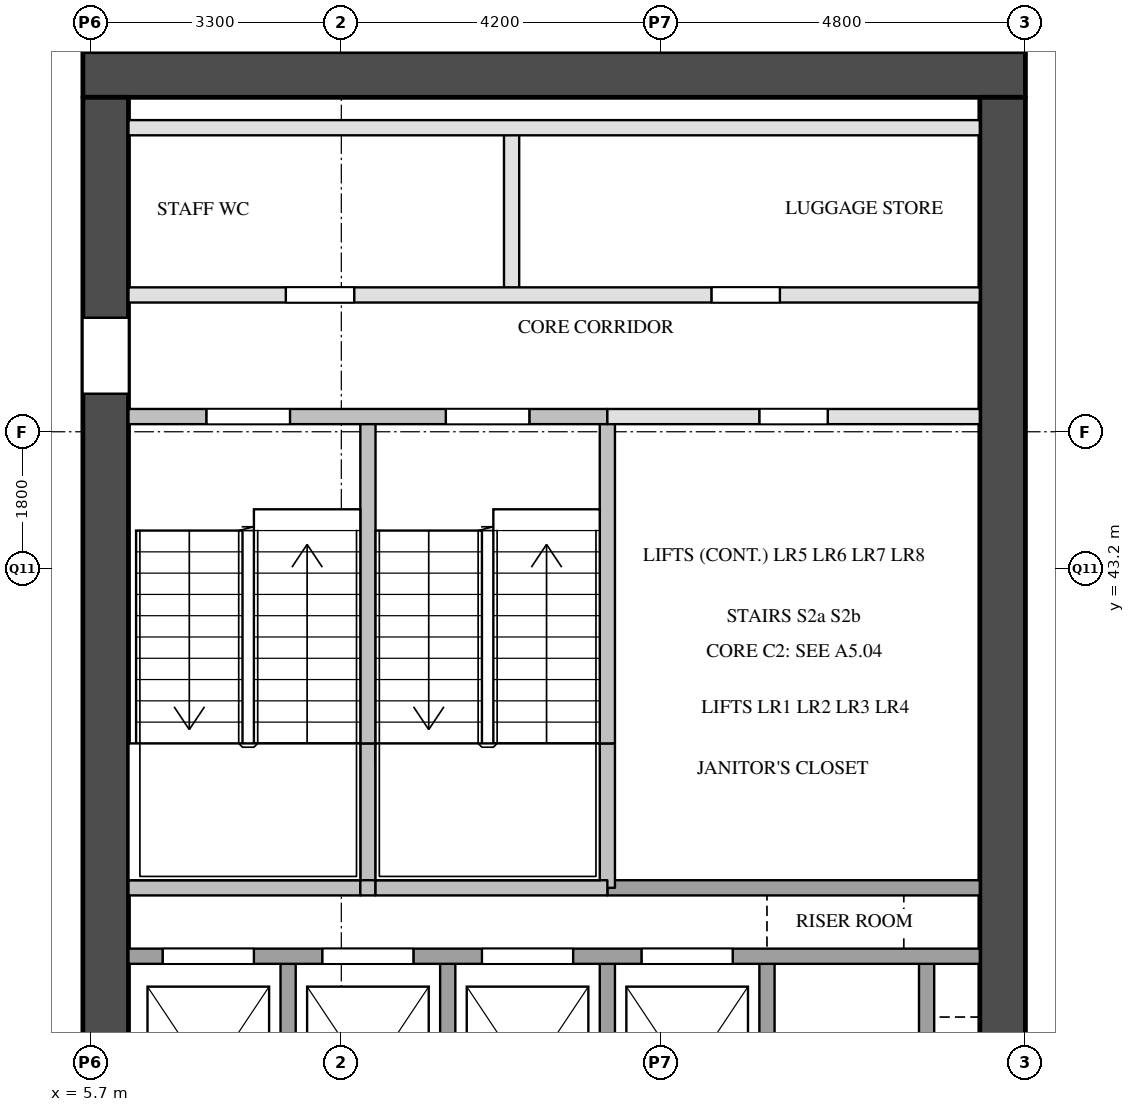
"""IFC4 building model, lengths in metres.
Left out: names, types, materials, properties, quantities, classifications, styles, units other than length and angle.
Written with IfcOpenShell. Run it as: python <this file> out.ifc"""

import sys

from ifc_helpers import new_model, si_unit, direction, frame, frame_2d, origin, place, context, subcontext, project, spatial, rectangle, extrude, element, fill, save


model = new_model("IFC4")
c1 = context("Model", 3, precision=1e-05, world=origin(), true_north=direction((0.0, 1.0)))
c2 = subcontext(c1, "Body", "Model", "MODEL_VIEW")
j1 = project(units=[si_unit("LENGTHUNIT", "METRE"), si_unit("PLANEANGLEUNIT", "RADIAN")], contexts=[c1])
p1 = place(None, origin())
s1 = spatial("IfcSite", under=j1, at=p1, CompositionType="ELEMENT")
p2 = place(p1, origin())
s2 = spatial("IfcBuilding", under=s1, at=p2, CompositionType="ELEMENT")
p3 = place(p2, frame((0.0, 0.0, 31.0)))
s3 = spatial("IfcBuildingStorey", under=s2, at=p3, CompositionType="ELEMENT", Elevation=31.0)
p4 = place(p3, frame((5.6, 49.7, 0.0), z_axis=(0.0, 0.0, 1.0), x_axis=(1.0, 0.0, 0.0)))
e1 = element("IfcWall", 1, at=p4, inside=s3, PredefinedType="SHEAR", context=c2, shape_type="SweptSolid", body=[
    extrude(rectangle(XDim=12.4, YDim=0.6, at=frame_2d((6.2, 0.0))), origin(), (0.0, 0.0, 1.0), 3.5),
])
p5 = place(p3, frame((5.9, 29.1, 0.0), z_axis=(0.0, 0.0, 1.0), x_axis=(0.0, 1.0, 0.0)))
e2 = element("IfcWall", 2, at=p5, inside=s3, PredefinedType="SHEAR", context=c2, shape_type="SweptSolid", body=[
    extrude(rectangle(XDim=20.3, YDim=0.6, at=frame_2d((10.15, 0.0))), origin(), (0.0, 0.0, 1.0), 3.5),
])
p6 = place(p5, frame((3.6, 0.0, 0.0)))
e3 = element("IfcOpeningElement", 3, at=p6, cuts=e2, PredefinedType="OPENING", context=c2, shape_type="SweptSolid", body=[
    extrude(rectangle(XDim=1.8, YDim=2.1, at=frame_2d((0.9, 1.05))), frame((0.0, 0.31, 0.0), z_axis=(0.0, -1.0, 0.0), x_axis=(1.0, 0.0, 0.0)), (0.0, 0.0, 1.0), 0.62),
])
p7 = place(p5, frame((16.4, 0.0, 0.0)))
e4 = element("IfcOpeningElement", 4, at=p7, cuts=e2, PredefinedType="OPENING", context=c2, shape_type="SweptSolid", body=[
    extrude(rectangle(XDim=1.0, YDim=2.1, at=frame_2d((0.5, 1.05))), frame((0.0, 0.31, 0.0), z_axis=(0.0, -1.0, 0.0), x_axis=(1.0, 0.0, 0.0)), (0.0, 0.0, 1.0), 0.62),
])
p8 = place(p3, frame((17.7, 29.1, 0.0), z_axis=(0.0, 0.0, 1.0), x_axis=(0.0, 1.0, 0.0)))
e5 = element("IfcWall", 5, at=p8, inside=s3, PredefinedType="SHEAR", context=c2, shape_type="SweptSolid", body=[
    extrude(rectangle(XDim=20.3, YDim=0.6, at=frame_2d((10.15, 0.0))), origin(), (0.0, 0.0, 1.0), 3.5),
])
p9 = place(p8, frame((1.25, 0.0, 0.0)))
e6 = element("IfcOpeningElement", 6, at=p9, cuts=e5, PredefinedType="OPENING", context=c2, shape_type="SweptSolid", body=[
    extrude(rectangle(XDim=0.7, YDim=2.1, at=frame_2d((0.35, 1.05))), frame((0.0, 0.31, 0.0), z_axis=(0.0, -1.0, 0.0), x_axis=(1.0, 0.0, 0.0)), (0.0, 0.0, 1.0), 0.62),
])
p10 = place(p8, frame((7.05, 0.0, 0.0)))
e7 = element("IfcOpeningElement", 7, at=p10, cuts=e5, PredefinedType="OPENING", context=c2, shape_type="SweptSolid", body=[
    extrude(rectangle(XDim=0.7, YDim=2.1, at=frame_2d((0.35, 1.05))), frame((0.0, 0.31, 0.0), z_axis=(0.0, -1.0, 0.0), x_axis=(1.0, 0.0, 0.0)), (0.0, 0.0, 1.0), 0.62),
])
p11 = place(p3, frame((8.3, 34.9, 0.0), z_axis=(0.0, 0.0, 1.0), x_axis=(0.0, 1.0, 0.0)))
e8 = element("IfcWall", 8, at=p11, inside=s3, PredefinedType="SOLIDWALL", context=c2, shape_type="SweptSolid", body=[
    extrude(rectangle(XDim=3.2, YDim=0.2, at=frame_2d((1.6, 0.0))), origin(), (0.0, 0.0, 1.0), 3.5),
])
p12 = place(p3, frame((9.35, 39.0, 0.0), z_axis=(0.0, 0.0, 1.0), x_axis=(0.0, 1.0, 0.0)))
e9 = element("IfcWall", 9, at=p12, inside=s3, PredefinedType="SOLIDWALL", context=c2, shape_type="SweptSolid", body=[
    extrude(rectangle(XDim=1.9, YDim=0.2, at=frame_2d((0.95, 0.0))), origin(), (0.0, 0.0, 1.0), 3.5),
])
p13 = place(p3, frame((9.35, 40.9, 0.0), z_axis=(0.0, 0.0, 1.0), x_axis=(0.0, 1.0, 0.0)))
e10 = element("IfcWall", 10, at=p13, inside=s3, PredefinedType="SOLIDWALL", context=c2, shape_type="SweptSolid", body=[
    extrude(rectangle(XDim=4.3, YDim=0.2, at=frame_2d((2.15, 0.0))), origin(), (0.0, 0.0, 1.0), 3.5),
])
p14 = place(p3, frame((10.4, 34.9, 0.0), z_axis=(0.0, 0.0, 1.0), x_axis=(0.0, 1.0, 0.0)))
e11 = element("IfcWall", 11, at=p14, inside=s3, PredefinedType="SOLIDWALL", context=c2, shape_type="SweptSolid", body=[
    extrude(rectangle(XDim=3.2, YDim=0.2, at=frame_2d((1.6, 0.0))), origin(), (0.0, 0.0, 1.0), 3.5),
])
p15 = place(p3, frame((11.24, 46.8, 0.0), z_axis=(0.0, 0.0, 1.0), x_axis=(0.0, 1.0, 0.0)))
e12 = element("IfcWall", 12, at=p15, inside=s3, PredefinedType="PARTITIONING", context=c2, shape_type="SweptSolid", body=[
    extrude(rectangle(XDim=2.2, YDim=0.2, at=frame_2d((1.1, 0.0))), origin(), (0.0, 0.0, 1.0), 3.5),
])
p16 = place(p3, frame((12.5, 34.9, 0.0), z_axis=(0.0, 0.0, 1.0), x_axis=(0.0, 1.0, 0.0)))
e13 = element("IfcWall", 13, at=p16, inside=s3, PredefinedType="SOLIDWALL", context=c2, shape_type="SweptSolid", body=[
    extrude(rectangle(XDim=3.2, YDim=0.2, at=frame_2d((1.6, 0.0))), origin(), (0.0, 0.0, 1.0), 3.5),
])
p17 = place(p3, frame((12.5, 39.0, 0.0), z_axis=(0.0, 0.0, 1.0), x_axis=(0.0, 1.0, 0.0)))
e14 = element("IfcWall", 14, at=p17, inside=s3, PredefinedType="SOLIDWALL", context=c2, shape_type="SweptSolid", body=[
    extrude(rectangle(XDim=1.9, YDim=0.2, at=frame_2d((0.95, 0.0))), origin(), (0.0, 0.0, 1.0), 3.5),
])
p18 = place(p3, frame((12.5, 40.9, 0.0), z_axis=(0.0, 0.0, 1.0), x_axis=(0.0, 1.0, 0.0)))
e15 = element("IfcWall", 15, at=p18, inside=s3, PredefinedType="SOLIDWALL", context=c2, shape_type="SweptSolid", body=[
    extrude(rectangle(XDim=4.3, YDim=0.2, at=frame_2d((2.15, 0.0))), origin(), (0.0, 0.0, 1.0), 3.5),
])
for number, where, z_axis, x_axis in (
    (16, (14.6, 34.9, 0.0), (0.0, 0.0, 1.0), (0.0, 1.0, 0.0)),
    (17, (16.7, 34.9, 0.0), (0.0, 0.0, 1.0), (0.0, 1.0, 0.0)),
):
    element("IfcWall", number, at=place(p3, frame(where, z_axis=z_axis, x_axis=x_axis)), inside=s3, PredefinedType="SOLIDWALL", context=c2, shape_type="SweptSolid", body=[
        extrude(rectangle(XDim=3.2, YDim=0.2, at=frame_2d((1.6, 0.0))), origin(), (0.0, 0.0, 1.0), 3.5),
    ])
p19 = place(p3, frame((6.2, 38.1, 0.0), z_axis=(0.0, 0.0, 1.0), x_axis=(1.0, 0.0, 0.0)))
e18 = element("IfcWall", 18, at=p19, inside=s3, PredefinedType="SOLIDWALL", context=c2, shape_type="SweptSolid", body=[
    extrude(rectangle(XDim=11.2, YDim=0.2, at=frame_2d((5.6, 0.0))), origin(), (0.0, 0.0, 1.0), 3.5),
])
p20 = place(p19, frame((0.45, 0.0, 0.0)))
e19 = element("IfcOpeningElement", 19, at=p20, cuts=e18, PredefinedType="OPENING", context=c2, shape_type="SweptSolid", body=[
    extrude(rectangle(XDim=1.2, YDim=2.1, at=frame_2d((0.6, 1.05))), frame((0.0, 0.11, 0.0), z_axis=(0.0, -1.0, 0.0), x_axis=(1.0, 0.0, 0.0)), (0.0, 0.0, 1.0), 0.22),
])
p21 = place(p19, frame((2.55, 0.0, 0.0)))
e20 = element("IfcOpeningElement", 20, at=p21, cuts=e18, PredefinedType="OPENING", context=c2, shape_type="SweptSolid", body=[
    extrude(rectangle(XDim=1.2, YDim=2.1, at=frame_2d((0.6, 1.05))), frame((0.0, 0.11, 0.0), z_axis=(0.0, -1.0, 0.0), x_axis=(1.0, 0.0, 0.0)), (0.0, 0.0, 1.0), 0.22),
])
p22 = place(p19, frame((4.65, 0.0, 0.0)))
e21 = element("IfcOpeningElement", 21, at=p22, cuts=e18, PredefinedType="OPENING", context=c2, shape_type="SweptSolid", body=[
    extrude(rectangle(XDim=1.2, YDim=2.1, at=frame_2d((0.6, 1.05))), frame((0.0, 0.11, 0.0), z_axis=(0.0, -1.0, 0.0), x_axis=(1.0, 0.0, 0.0)), (0.0, 0.0, 1.0), 0.22),
])
p23 = place(p19, frame((6.75, 0.0, 0.0)))
e22 = element("IfcOpeningElement", 22, at=p23, cuts=e18, PredefinedType="OPENING", context=c2, shape_type="SweptSolid", body=[
    extrude(rectangle(XDim=1.2, YDim=2.1, at=frame_2d((0.6, 1.05))), frame((0.0, 0.11, 0.0), z_axis=(0.0, -1.0, 0.0), x_axis=(1.0, 0.0, 0.0)), (0.0, 0.0, 1.0), 0.22),
])
p24 = place(p3, frame((12.5, 39.0, 0.0), z_axis=(0.0, 0.0, 1.0), x_axis=(1.0, 0.0, 0.0)))
e23 = element("IfcWall", 23, at=p24, inside=s3, PredefinedType="SOLIDWALL", context=c2, shape_type="SweptSolid", body=[
    extrude(rectangle(XDim=4.9, YDim=0.2, at=frame_2d((2.45, 0.0))), origin(), (0.0, 0.0, 1.0), 3.5),
])
p25 = place(p3, frame((6.2, 39.0, 0.0), z_axis=(0.0, 0.0, 1.0), x_axis=(1.0, 0.0, 0.0)))
e24 = element("IfcWall", 24, at=p25, inside=s3, PredefinedType="SOLIDWALL", context=c2, shape_type="SweptSolid", body=[
    extrude(rectangle(XDim=3.05, YDim=0.2, at=frame_2d((1.525, 0.0))), origin(), (0.0, 0.0, 1.0), 3.5),
])
p26 = place(p3, frame((9.25, 39.0, 0.0), z_axis=(0.0, 0.0, 1.0), x_axis=(1.0, 0.0, 0.0)))
e25 = element("IfcWall", 25, at=p26, inside=s3, PredefinedType="SOLIDWALL", context=c2, shape_type="SweptSolid", body=[
    extrude(rectangle(XDim=0.2, YDim=0.2, at=frame_2d((0.1, 0.0))), origin(), (0.0, 0.0, 1.0), 3.5),
])
p27 = place(p3, frame((9.45, 39.0, 0.0), z_axis=(0.0, 0.0, 1.0), x_axis=(1.0, 0.0, 0.0)))
e26 = element("IfcWall", 26, at=p27, inside=s3, PredefinedType="SOLIDWALL", context=c2, shape_type="SweptSolid", body=[
    extrude(rectangle(XDim=3.05, YDim=0.2, at=frame_2d((1.525, 0.0))), origin(), (0.0, 0.0, 1.0), 3.5),
])
p28 = place(p3, frame((12.5, 45.2, 0.0), z_axis=(0.0, 0.0, 1.0), x_axis=(1.0, 0.0, 0.0)))
e27 = element("IfcWall", 27, at=p28, inside=s3, PredefinedType="PARTITIONING", context=c2, shape_type="SweptSolid", body=[
    extrude(rectangle(XDim=4.9, YDim=0.2, at=frame_2d((2.45, 0.0))), origin(), (0.0, 0.0, 1.0), 3.5),
])
p29 = place(p28, frame((2.0, 0.0, 0.0)))
e28 = element("IfcOpeningElement", 28, at=p29, cuts=e27, PredefinedType="OPENING", context=c2, shape_type="SweptSolid", body=[
    extrude(rectangle(XDim=0.9, YDim=2.1, at=frame_2d((0.45, 1.05))), frame((0.0, 0.11, 0.0), z_axis=(0.0, -1.0, 0.0), x_axis=(1.0, 0.0, 0.0)), (0.0, 0.0, 1.0), 0.22),
])
p30 = place(p3, frame((6.2, 45.2, 0.0), z_axis=(0.0, 0.0, 1.0), x_axis=(1.0, 0.0, 0.0)))
e29 = element("IfcWall", 29, at=p30, inside=s3, PredefinedType="SOLIDWALL", context=c2, shape_type="SweptSolid", body=[
    extrude(rectangle(XDim=6.3, YDim=0.2, at=frame_2d((3.15, 0.0))), origin(), (0.0, 0.0, 1.0), 3.5),
])
p31 = place(p30, frame((1.025, 0.0, 0.0)))
e30 = element("IfcOpeningElement", 30, at=p31, cuts=e29, PredefinedType="OPENING", context=c2, shape_type="SweptSolid", body=[
    extrude(rectangle(XDim=1.1, YDim=2.1, at=frame_2d((0.55, 1.05))), frame((0.0, 0.11, 0.0), z_axis=(0.0, -1.0, 0.0), x_axis=(1.0, 0.0, 0.0)), (0.0, 0.0, 1.0), 0.22),
])
p32 = place(p30, frame((4.175, 0.0, 0.0)))
e31 = element("IfcOpeningElement", 31, at=p32, cuts=e29, PredefinedType="OPENING", context=c2, shape_type="SweptSolid", body=[
    extrude(rectangle(XDim=1.1, YDim=2.1, at=frame_2d((0.55, 1.05))), frame((0.0, 0.11, 0.0), z_axis=(0.0, -1.0, 0.0), x_axis=(1.0, 0.0, 0.0)), (0.0, 0.0, 1.0), 0.22),
])
p33 = place(p3, frame((6.2, 46.8, 0.0), z_axis=(0.0, 0.0, 1.0), x_axis=(1.0, 0.0, 0.0)))
e32 = element("IfcWall", 32, at=p33, inside=s3, PredefinedType="PARTITIONING", context=c2, shape_type="SweptSolid", body=[
    extrude(rectangle(XDim=11.2, YDim=0.2, at=frame_2d((5.6, 0.0))), origin(), (0.0, 0.0, 1.0), 3.5),
])
p34 = place(p33, frame((2.07, 0.0, 0.0)))
e33 = element("IfcOpeningElement", 33, at=p34, cuts=e32, PredefinedType="OPENING", context=c2, shape_type="SweptSolid", body=[
    extrude(rectangle(XDim=0.9, YDim=2.1, at=frame_2d((0.45, 1.05))), frame((0.0, 0.11, 0.0), z_axis=(0.0, -1.0, 0.0), x_axis=(1.0, 0.0, 0.0)), (0.0, 0.0, 1.0), 0.22),
])
p35 = place(p33, frame((7.67, 0.0, 0.0)))
e34 = element("IfcOpeningElement", 34, at=p35, cuts=e32, PredefinedType="OPENING", context=c2, shape_type="SweptSolid", body=[
    extrude(rectangle(XDim=0.9, YDim=2.1, at=frame_2d((0.45, 1.05))), frame((0.0, 0.11, 0.0), z_axis=(0.0, -1.0, 0.0), x_axis=(1.0, 0.0, 0.0)), (0.0, 0.0, 1.0), 0.22),
])
p36 = place(p3, frame((6.2, 49.0, 0.0), z_axis=(0.0, 0.0, 1.0), x_axis=(1.0, 0.0, 0.0)))
e35 = element("IfcWall", 35, at=p36, inside=s3, PredefinedType="PARTITIONING", context=c2, shape_type="SweptSolid", body=[
    extrude(rectangle(XDim=11.2, YDim=0.2, at=frame_2d((5.6, 0.0))), origin(), (0.0, 0.0, 1.0), 3.5),
])
p37 = place(p20, origin())
e36 = element("IfcDoor", 36, at=p37, inside=s3, OperationType="SLIDING_TO_LEFT", PredefinedType="DOOR", context=c2, shape_type="SweptSolid", body=[
    extrude(rectangle(XDim=1.2, YDim=2.1, at=frame_2d((0.6, 1.05))), frame((0.0, 0.025, 0.0), z_axis=(0.0, -1.0, 0.0), x_axis=(1.0, 0.0, 0.0)), (0.0, 0.0, 1.0), 0.05),
])
fill(e19, e36)
p38 = place(p21, origin())
e37 = element("IfcDoor", 37, at=p38, inside=s3, OperationType="SLIDING_TO_LEFT", PredefinedType="DOOR", context=c2, shape_type="SweptSolid", body=[
    extrude(rectangle(XDim=1.2, YDim=2.1, at=frame_2d((0.6, 1.05))), frame((0.0, 0.025, 0.0), z_axis=(0.0, -1.0, 0.0), x_axis=(1.0, 0.0, 0.0)), (0.0, 0.0, 1.0), 0.05),
])
fill(e20, e37)
p39 = place(p22, origin())
e38 = element("IfcDoor", 38, at=p39, inside=s3, OperationType="SLIDING_TO_LEFT", PredefinedType="DOOR", context=c2, shape_type="SweptSolid", body=[
    extrude(rectangle(XDim=1.2, YDim=2.1, at=frame_2d((0.6, 1.05))), frame((0.0, 0.025, 0.0), z_axis=(0.0, -1.0, 0.0), x_axis=(1.0, 0.0, 0.0)), (0.0, 0.0, 1.0), 0.05),
])
fill(e21, e38)
p40 = place(p23, origin())
e39 = element("IfcDoor", 39, at=p40, inside=s3, OperationType="SLIDING_TO_LEFT", PredefinedType="DOOR", context=c2, shape_type="SweptSolid", body=[
    extrude(rectangle(XDim=1.2, YDim=2.1, at=frame_2d((0.6, 1.05))), frame((0.0, 0.025, 0.0), z_axis=(0.0, -1.0, 0.0), x_axis=(1.0, 0.0, 0.0)), (0.0, 0.0, 1.0), 0.05),
])
fill(e22, e39)
p41 = place(p31, origin())
e40 = element("IfcDoor", 40, at=p41, inside=s3, OperationType="SINGLE_SWING_LEFT", PredefinedType="DOOR", context=c2, shape_type="SweptSolid", body=[
    extrude(rectangle(XDim=1.1, YDim=2.1, at=frame_2d((0.55, 1.05))), frame((0.0, 0.025, 0.0), z_axis=(0.0, -1.0, 0.0), x_axis=(1.0, 0.0, 0.0)), (0.0, 0.0, 1.0), 0.05),
])
fill(e30, e40)
p42 = place(p32, origin())
e41 = element("IfcDoor", 41, at=p42, inside=s3, OperationType="SINGLE_SWING_RIGHT", PredefinedType="DOOR", context=c2, shape_type="SweptSolid", body=[
    extrude(rectangle(XDim=1.1, YDim=2.1, at=frame_2d((0.55, 1.05))), frame((0.0, 0.025, 0.0), z_axis=(0.0, -1.0, 0.0), x_axis=(1.0, 0.0, 0.0)), (0.0, 0.0, 1.0), 0.05),
])
fill(e31, e41)
p43 = place(p7, origin())
e42 = element("IfcDoor", 42, at=p43, inside=s3, OperationType="SINGLE_SWING_RIGHT", PredefinedType="DOOR", context=c2, shape_type="SweptSolid", body=[
    extrude(rectangle(XDim=1.0, YDim=2.1, at=frame_2d((0.5, 1.05))), frame((0.0, 0.025, 0.0), z_axis=(0.0, -1.0, 0.0), x_axis=(1.0, 0.0, 0.0)), (0.0, 0.0, 1.0), 0.05),
])
fill(e4, e42)
p44 = place(p34, origin())
e43 = element("IfcDoor", 43, at=p44, inside=s3, OperationType="SINGLE_SWING_LEFT", PredefinedType="DOOR", context=c2, shape_type="SweptSolid", body=[
    extrude(rectangle(XDim=0.9, YDim=2.1, at=frame_2d((0.45, 1.05))), frame((0.0, 0.025, 0.0), z_axis=(0.0, -1.0, 0.0), x_axis=(1.0, 0.0, 0.0)), (0.0, 0.0, 1.0), 0.05),
])
fill(e33, e43)
p45 = place(p35, origin())
e44 = element("IfcDoor", 44, at=p45, inside=s3, OperationType="SINGLE_SWING_RIGHT", PredefinedType="DOOR", context=c2, shape_type="SweptSolid", body=[
    extrude(rectangle(XDim=0.9, YDim=2.1, at=frame_2d((0.45, 1.05))), frame((0.0, 0.025, 0.0), z_axis=(0.0, -1.0, 0.0), x_axis=(1.0, 0.0, 0.0)), (0.0, 0.0, 1.0), 0.05),
])
fill(e34, e44)
p46 = place(p29, origin())
e45 = element("IfcDoor", 45, at=p46, inside=s3, OperationType="SINGLE_SWING_RIGHT", PredefinedType="DOOR", context=c2, shape_type="SweptSolid", body=[
    extrude(rectangle(XDim=0.9, YDim=2.1, at=frame_2d((0.45, 1.05))), frame((0.0, 0.025, 0.0), z_axis=(0.0, -1.0, 0.0), x_axis=(1.0, 0.0, 0.0)), (0.0, 0.0, 1.0), 0.05),
])
fill(e28, e45)
save(model, sys.argv[1])
